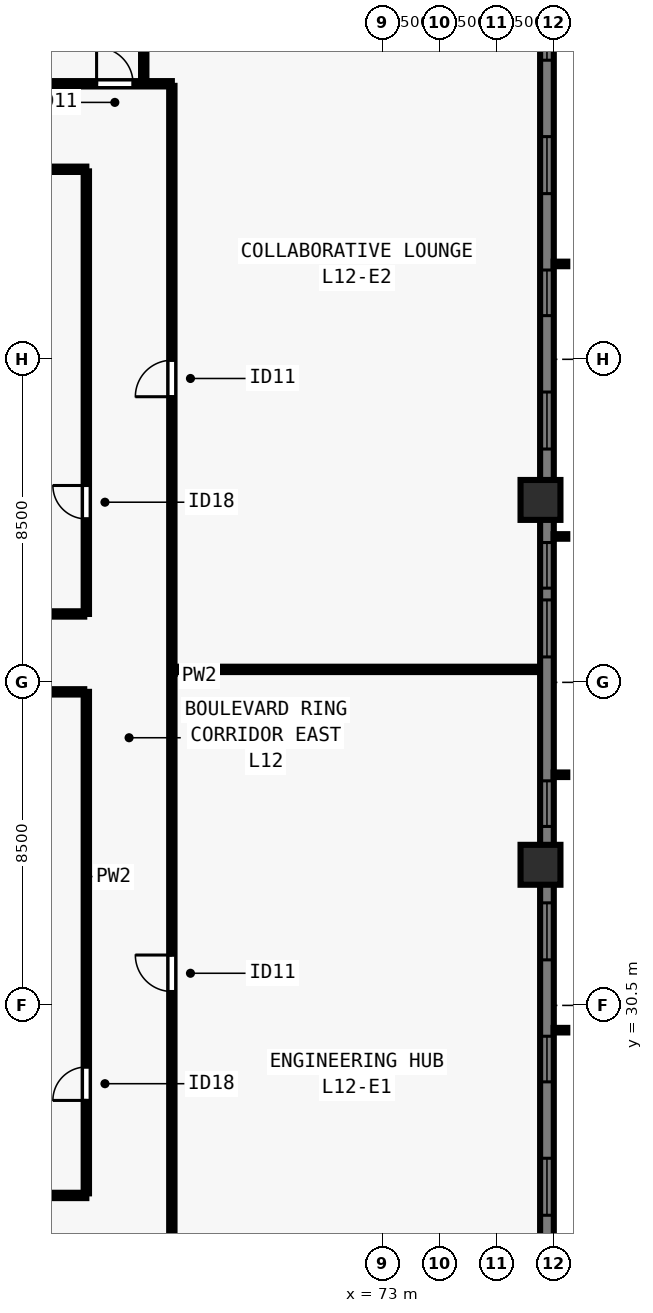
"""IFC4 building model, lengths in metres.
Left out: names, types, materials, properties, quantities, classifications, styles, units other than length and angle.
Written with IfcOpenShell. Run it as: python <this file> out.ifc"""

import sys

from ifc_helpers import new_model, si_unit, direction, frame, frame_2d, origin, origin_2d, place, context, subcontext, project, spatial, rectangle, extrude, element, fill, save


model = new_model("IFC4")
c1 = context("Model", 3, precision=1e-05, world=origin(), true_north=direction((0.0, 1.0)))
c2 = subcontext(c1, "Body", "Model", "MODEL_VIEW")
j1 = project(units=[si_unit("LENGTHUNIT", "METRE"), si_unit("PLANEANGLEUNIT", "RADIAN")], contexts=[c1])
p1 = place(None, origin())
s1 = spatial("IfcSite", under=j1, at=p1, CompositionType="ELEMENT")
p2 = place(p1, origin())
s2 = spatial("IfcBuilding", under=s1, at=p2, CompositionType="ELEMENT")
p3 = place(p2, frame((0.0, 0.0, 48.0)))
s3 = spatial("IfcBuildingStorey", under=s2, at=p3, CompositionType="ELEMENT", Elevation=48.0)
for number, where, z_axis, x_axis in (
    (1, (77.15, 34.2, 0.0), (0.0, 0.0, 1.0), (0.0, 1.0, 0.0)),
    (2, (77.15, 43.8, 0.0), (0.0, 0.0, 1.0), (0.0, 1.0, 0.0)),
):
    element("IfcColumn", number, at=place(p3, frame(where, z_axis=z_axis, x_axis=x_axis)), inside=s3, PredefinedType="COLUMN", context=c2, shape_type="SweptSolid", body=[
        extrude(rectangle(XDim=1.05, YDim=1.05, at=origin_2d()), origin(), (0.0, 0.0, 1.0), 3.5),
    ])
p4 = place(p3, frame((77.32, 61.5, 0.0), z_axis=(0.0, 0.0, 1.0), x_axis=(0.0, -1.0, 0.0)))
e3 = element("IfcWall", 3, at=p4, inside=s3, PredefinedType="SOLIDWALL", context=c2, shape_type="SweptSolid", body=[
    extrude(rectangle(XDim=44.662, YDim=0.36, at=frame_2d((22.331, 0.0))), origin(), (0.0, 0.0, 1.0), 3.28),
])
p5 = place(p4, frame((4.93, 0.0, 0.8)))
e4 = element("IfcOpeningElement", 4, at=p5, cuts=e3, PredefinedType="OPENING", context=c2, shape_type="SweptSolid", body=[
    extrude(rectangle(XDim=1.2, YDim=1.544, at=frame_2d((0.6, 0.772))), frame((0.0, 0.19, 0.0), z_axis=(0.0, -1.0, 0.0), x_axis=(1.0, 0.0, 0.0)), (0.0, 0.0, 1.0), 0.38),
])
p6 = place(p4, frame((8.14, 0.0, 0.8)))
e5 = element("IfcOpeningElement", 5, at=p6, cuts=e3, PredefinedType="OPENING", context=c2, shape_type="SweptSolid", body=[
    extrude(rectangle(XDim=1.5, YDim=1.544, at=frame_2d((0.75, 0.772))), frame((0.0, 0.19, 0.0), z_axis=(0.0, -1.0, 0.0), x_axis=(1.0, 0.0, 0.0)), (0.0, 0.0, 1.0), 0.38),
])
p7 = place(p4, frame((11.65, 0.0, 0.8)))
e6 = element("IfcOpeningElement", 6, at=p7, cuts=e3, PredefinedType="OPENING", context=c2, shape_type="SweptSolid", body=[
    extrude(rectangle(XDim=1.2, YDim=1.544, at=frame_2d((0.6, 0.772))), frame((0.0, 0.19, 0.0), z_axis=(0.0, -1.0, 0.0), x_axis=(1.0, 0.0, 0.0)), (0.0, 0.0, 1.0), 0.38),
])
p8 = place(p4, frame((14.861, 0.0, 0.8)))
e7 = element("IfcOpeningElement", 7, at=p8, cuts=e3, PredefinedType="OPENING", context=c2, shape_type="SweptSolid", body=[
    extrude(rectangle(XDim=1.5, YDim=1.544, at=frame_2d((0.75, 0.772))), frame((0.0, 0.19, 0.0), z_axis=(0.0, -1.0, 0.0), x_axis=(1.0, 0.0, 0.0)), (0.0, 0.0, 1.0), 0.38),
])
p9 = place(p4, frame((18.821, 0.0, 0.8)))
e8 = element("IfcOpeningElement", 8, at=p9, cuts=e3, PredefinedType="OPENING", context=c2, shape_type="SweptSolid", body=[
    extrude(rectangle(XDim=1.2, YDim=1.544, at=frame_2d((0.6, 0.772))), frame((0.0, 0.19, 0.0), z_axis=(0.0, -1.0, 0.0), x_axis=(1.0, 0.0, 0.0)), (0.0, 0.0, 1.0), 0.38),
])
p10 = place(p4, frame((20.331, 0.0, 0.8)))
e9 = element("IfcOpeningElement", 9, at=p10, cuts=e3, PredefinedType="OPENING", context=c2, shape_type="SweptSolid", body=[
    extrude(rectangle(XDim=1.5, YDim=1.544, at=frame_2d((0.75, 0.772))), frame((0.0, 0.19, 0.0), z_axis=(0.0, -1.0, 0.0), x_axis=(1.0, 0.0, 0.0)), (0.0, 0.0, 1.0), 0.38),
])
p11 = place(p4, frame((25.091, 0.0, 0.8)))
e10 = element("IfcOpeningElement", 10, at=p11, cuts=e3, PredefinedType="OPENING", context=c2, shape_type="SweptSolid", body=[
    extrude(rectangle(XDim=1.2, YDim=1.544, at=frame_2d((0.6, 0.772))), frame((0.0, 0.19, 0.0), z_axis=(0.0, -1.0, 0.0), x_axis=(1.0, 0.0, 0.0)), (0.0, 0.0, 1.0), 0.38),
])
p12 = place(p4, frame((28.302, 0.0, 0.8)))
e11 = element("IfcOpeningElement", 11, at=p12, cuts=e3, PredefinedType="OPENING", context=c2, shape_type="SweptSolid", body=[
    extrude(rectangle(XDim=1.5, YDim=1.544, at=frame_2d((0.75, 0.772))), frame((0.0, 0.19, 0.0), z_axis=(0.0, -1.0, 0.0), x_axis=(1.0, 0.0, 0.0)), (0.0, 0.0, 1.0), 0.38),
])
p13 = place(p4, frame((31.812, 0.0, 0.8)))
e12 = element("IfcOpeningElement", 12, at=p13, cuts=e3, PredefinedType="OPENING", context=c2, shape_type="SweptSolid", body=[
    extrude(rectangle(XDim=1.2, YDim=1.544, at=frame_2d((0.6, 0.772))), frame((0.0, 0.19, 0.0), z_axis=(0.0, -1.0, 0.0), x_axis=(1.0, 0.0, 0.0)), (0.0, 0.0, 1.0), 0.38),
])
p14 = place(p4, frame((35.022, 0.0, 0.8)))
e13 = element("IfcOpeningElement", 13, at=p14, cuts=e3, PredefinedType="OPENING", context=c2, shape_type="SweptSolid", body=[
    extrude(rectangle(XDim=1.5, YDim=1.544, at=frame_2d((0.75, 0.772))), frame((0.0, 0.19, 0.0), z_axis=(0.0, -1.0, 0.0), x_axis=(1.0, 0.0, 0.0)), (0.0, 0.0, 1.0), 0.38),
])
p15 = place(p4, frame((38.532, 0.0, 0.8)))
e14 = element("IfcOpeningElement", 14, at=p15, cuts=e3, PredefinedType="OPENING", context=c2, shape_type="SweptSolid", body=[
    extrude(rectangle(XDim=1.2, YDim=1.544, at=frame_2d((0.6, 0.772))), frame((0.0, 0.19, 0.0), z_axis=(0.0, -1.0, 0.0), x_axis=(1.0, 0.0, 0.0)), (0.0, 0.0, 1.0), 0.38),
])
p16 = place(p3, frame((36.55, 54.75, 0.0), z_axis=(0.0, 0.0, 1.0), x_axis=(1.0, 0.0, 0.0)))
e15 = element("IfcWall", 15, at=p16, inside=s3, PredefinedType="PARTITIONING", context=c2, shape_type="SweptSolid", body=[
    extrude(rectangle(XDim=30.9, YDim=0.14, at=frame_2d((15.45, 0.0))), origin(), (0.0, 0.0, 1.0), 3.28),
])
p17 = place(p16, frame((3.69, 0.0, 0.0)))
e16 = element("IfcOpeningElement", 16, at=p17, cuts=e15, PredefinedType="OPENING", context=c2, shape_type="SweptSolid", body=[
    extrude(rectangle(XDim=0.96, YDim=2.12, at=frame_2d((0.48, 1.06))), frame((0.0, 0.08, 0.0), z_axis=(0.0, -1.0, 0.0), x_axis=(1.0, 0.0, 0.0)), (0.0, 0.0, 1.0), 0.16),
])
p18 = place(p16, frame((5.013, 0.0, 0.0)))
e17 = element("IfcOpeningElement", 17, at=p18, cuts=e15, PredefinedType="OPENING", context=c2, shape_type="SweptSolid", body=[
    extrude(rectangle(XDim=0.96, YDim=2.12, at=frame_2d((0.48, 1.06))), frame((0.0, 0.08, 0.0), z_axis=(0.0, -1.0, 0.0), x_axis=(1.0, 0.0, 0.0)), (0.0, 0.0, 1.0), 0.16),
])
p19 = place(p16, frame((15.045, 0.0, 0.0)))
e18 = element("IfcOpeningElement", 18, at=p19, cuts=e15, PredefinedType="OPENING", context=c2, shape_type="SweptSolid", body=[
    extrude(rectangle(XDim=0.96, YDim=2.12, at=frame_2d((0.48, 1.06))), frame((0.0, 0.08, 0.0), z_axis=(0.0, -1.0, 0.0), x_axis=(1.0, 0.0, 0.0)), (0.0, 0.0, 1.0), 0.16),
])
p20 = place(p16, frame((25.077, 0.0, 0.0)))
e19 = element("IfcOpeningElement", 19, at=p20, cuts=e15, PredefinedType="OPENING", context=c2, shape_type="SweptSolid", body=[
    extrude(rectangle(XDim=0.96, YDim=2.12, at=frame_2d((0.48, 1.06))), frame((0.0, 0.08, 0.0), z_axis=(0.0, -1.0, 0.0), x_axis=(1.0, 0.0, 0.0)), (0.0, 0.0, 1.0), 0.16),
])
p21 = place(p16, frame((28.92, 0.0, 0.0)))
e20 = element("IfcOpeningElement", 20, at=p21, cuts=e15, PredefinedType="OPENING", context=c2, shape_type="SweptSolid", body=[
    extrude(rectangle(XDim=0.96, YDim=2.12, at=frame_2d((0.48, 1.06))), frame((0.0, 0.08, 0.0), z_axis=(0.0, -1.0, 0.0), x_axis=(1.0, 0.0, 0.0)), (0.0, 0.0, 1.0), 0.16),
])
p22 = place(p3, frame((67.45, 23.305, 0.0), z_axis=(0.0, 0.0, 1.0), x_axis=(0.0, 1.0, 0.0)))
e21 = element("IfcWall", 21, at=p22, inside=s3, PredefinedType="PARTITIONING", context=c2, shape_type="SweptSolid", body=[
    extrude(rectangle(XDim=31.39, YDim=0.14, at=frame_2d((15.695, 0.0))), origin(), (0.0, 0.0, 1.0), 3.28),
])
p23 = place(p22, frame((7.561, 0.0, 0.0)))
e22 = element("IfcOpeningElement", 22, at=p23, cuts=e21, PredefinedType="OPENING", context=c2, shape_type="SweptSolid", body=[
    extrude(rectangle(XDim=0.96, YDim=2.12, at=frame_2d((0.48, 1.06))), frame((0.0, 0.08, 0.0), z_axis=(0.0, -1.0, 0.0), x_axis=(1.0, 0.0, 0.0)), (0.0, 0.0, 1.0), 0.16),
])
p24 = place(p22, frame((23.211, 0.0, 0.0)))
e23 = element("IfcOpeningElement", 23, at=p24, cuts=e21, PredefinedType="OPENING", context=c2, shape_type="SweptSolid", body=[
    extrude(rectangle(XDim=0.96, YDim=2.12, at=frame_2d((0.48, 1.06))), frame((0.0, 0.08, 0.0), z_axis=(0.0, -1.0, 0.0), x_axis=(1.0, 0.0, 0.0)), (0.0, 0.0, 1.0), 0.16),
])
p25 = place(p3, frame((38.8, 25.5, 0.0), z_axis=(0.0, 0.0, 1.0), x_axis=(1.0, 0.0, 0.0)))
e24 = element("IfcWall", 24, at=p25, inside=s3, PredefinedType="PARTITIONING", context=c2, shape_type="SweptSolid", body=[
    extrude(rectangle(XDim=26.4, YDim=0.14, at=frame_2d((13.2, 0.0))), origin(), (0.0, 0.0, 1.0), 3.28),
])
p26 = place(p25, frame((1.2, 0.0, 0.0)))
e25 = element("IfcOpeningElement", 25, at=p26, cuts=e24, PredefinedType="OPENING", context=c2, shape_type="SweptSolid", body=[
    extrude(rectangle(XDim=0.88, YDim=2.1, at=frame_2d((0.44, 1.05))), frame((0.0, 0.08, 0.0), z_axis=(0.0, -1.0, 0.0), x_axis=(1.0, 0.0, 0.0)), (0.0, 0.0, 1.0), 0.16),
])
p27 = place(p25, frame((9.7, 0.0, 0.0)))
e26 = element("IfcOpeningElement", 26, at=p27, cuts=e24, PredefinedType="OPENING", context=c2, shape_type="SweptSolid", body=[
    extrude(rectangle(XDim=0.88, YDim=2.1, at=frame_2d((0.44, 1.05))), frame((0.0, 0.08, 0.0), z_axis=(0.0, -1.0, 0.0), x_axis=(1.0, 0.0, 0.0)), (0.0, 0.0, 1.0), 0.16),
])
p28 = place(p25, frame((20.2, 0.0, 0.0)))
e27 = element("IfcOpeningElement", 27, at=p28, cuts=e24, PredefinedType="OPENING", context=c2, shape_type="SweptSolid", body=[
    extrude(rectangle(XDim=0.88, YDim=2.1, at=frame_2d((0.44, 1.05))), frame((0.0, 0.08, 0.0), z_axis=(0.0, -1.0, 0.0), x_axis=(1.0, 0.0, 0.0)), (0.0, 0.0, 1.0), 0.16),
])
p29 = place(p3, frame((38.8, 52.5, 0.0), z_axis=(0.0, 0.0, 1.0), x_axis=(1.0, 0.0, 0.0)))
e28 = element("IfcWall", 28, at=p29, inside=s3, PredefinedType="PARTITIONING", context=c2, shape_type="SweptSolid", body=[
    extrude(rectangle(XDim=26.4, YDim=0.14, at=frame_2d((13.2, 0.0))), origin(), (0.0, 0.0, 1.0), 3.28),
])
p30 = place(p29, frame((2.2, 0.0, 0.0)))
e29 = element("IfcOpeningElement", 29, at=p30, cuts=e28, PredefinedType="OPENING", context=c2, shape_type="SweptSolid", body=[
    extrude(rectangle(XDim=0.88, YDim=2.1, at=frame_2d((0.44, 1.05))), frame((0.0, 0.08, 0.0), z_axis=(0.0, -1.0, 0.0), x_axis=(1.0, 0.0, 0.0)), (0.0, 0.0, 1.0), 0.16),
])
p31 = place(p29, frame((13.7, 0.0, 0.0)))
e30 = element("IfcOpeningElement", 30, at=p31, cuts=e28, PredefinedType="OPENING", context=c2, shape_type="SweptSolid", body=[
    extrude(rectangle(XDim=0.88, YDim=2.1, at=frame_2d((0.44, 1.05))), frame((0.0, 0.08, 0.0), z_axis=(0.0, -1.0, 0.0), x_axis=(1.0, 0.0, 0.0)), (0.0, 0.0, 1.0), 0.16),
])
p32 = place(p29, frame((23.2, 0.0, 0.0)))
e31 = element("IfcOpeningElement", 31, at=p32, cuts=e28, PredefinedType="OPENING", context=c2, shape_type="SweptSolid", body=[
    extrude(rectangle(XDim=0.88, YDim=2.1, at=frame_2d((0.44, 1.05))), frame((0.0, 0.08, 0.0), z_axis=(0.0, -1.0, 0.0), x_axis=(1.0, 0.0, 0.0)), (0.0, 0.0, 1.0), 0.16),
])
p33 = place(p3, frame((65.2, 25.555, 0.0), z_axis=(0.0, 0.0, 1.0), x_axis=(0.0, 1.0, 0.0)))
e32 = element("IfcWall", 32, at=p33, inside=s3, PredefinedType="PARTITIONING", context=c2, shape_type="SweptSolid", body=[
    extrude(rectangle(XDim=13.195, YDim=0.14, at=frame_2d((6.598, 0.0))), origin(), (0.0, 0.0, 1.0), 3.28),
])
p34 = place(p33, frame((2.445, 0.0, 0.0)))
e33 = element("IfcOpeningElement", 33, at=p34, cuts=e32, PredefinedType="OPENING", context=c2, shape_type="SweptSolid", body=[
    extrude(rectangle(XDim=0.88, YDim=2.1, at=frame_2d((0.44, 1.05))), frame((0.0, 0.08, 0.0), z_axis=(0.0, -1.0, 0.0), x_axis=(1.0, 0.0, 0.0)), (0.0, 0.0, 1.0), 0.16),
])
p35 = place(p3, frame((65.2, 40.8, 0.0), z_axis=(0.0, 0.0, 1.0), x_axis=(0.0, 1.0, 0.0)))
e34 = element("IfcWall", 34, at=p35, inside=s3, PredefinedType="PARTITIONING", context=c2, shape_type="SweptSolid", body=[
    extrude(rectangle(XDim=11.645, YDim=0.14, at=frame_2d((5.823, 0.0))), origin(), (0.0, 0.0, 1.0), 3.28),
])
p36 = place(p35, frame((2.5, 0.0, 0.0)))
e35 = element("IfcOpeningElement", 35, at=p36, cuts=e34, PredefinedType="OPENING", context=c2, shape_type="SweptSolid", body=[
    extrude(rectangle(XDim=0.88, YDim=2.1, at=frame_2d((0.44, 1.05))), frame((0.0, 0.08, 0.0), z_axis=(0.0, -1.0, 0.0), x_axis=(1.0, 0.0, 0.0)), (0.0, 0.0, 1.0), 0.16),
])
for number, where, z_axis, x_axis in (
    (36, (60.76, 38.75, 0.0), (0.0, 0.0, 1.0), (1.0, 0.0, 0.0)),
    (37, (60.76, 40.8, 0.0), (0.0, 0.0, 1.0), (1.0, 0.0, 0.0)),
):
    element("IfcWall", number, at=place(p3, frame(where, z_axis=z_axis, x_axis=x_axis)), inside=s3, PredefinedType="PARTITIONING", context=c2, shape_type="SweptSolid", body=[
        extrude(rectangle(XDim=4.385, YDim=0.14, at=frame_2d((2.192, 0.0))), origin(), (0.0, 0.0, 1.0), 3.28),
    ])
p37 = place(p3, frame((66.71, 54.85, 0.0), z_axis=(0.0, 0.0, 1.0), x_axis=(0.0, 1.0, 0.0)))
e38 = element("IfcWall", 38, at=p37, inside=s3, PredefinedType="PARTITIONING", context=c2, shape_type="SweptSolid", body=[
    extrude(rectangle(XDim=9.23, YDim=0.14, at=frame_2d((4.615, 0.0))), origin(), (0.0, 0.0, 1.0), 2.439),
])
p38 = place(p3, frame((67.55, 39.341, 0.0), z_axis=(0.0, 0.0, 1.0), x_axis=(1.0, 0.0, 0.0)))
e39 = element("IfcWall", 39, at=p38, inside=s3, PredefinedType="PARTITIONING", context=c2, shape_type="SweptSolid", body=[
    extrude(rectangle(XDim=9.53, YDim=0.14, at=frame_2d((4.765, 0.0))), origin(), (0.0, 0.0, 1.0), 3.28),
])
p39 = place(p5, origin())
e40 = element("IfcWindow", 40, at=p39, inside=s3, PartitioningType="SINGLE_PANEL", PredefinedType="WINDOW", context=c2, shape_type="SweptSolid", body=[
    extrude(rectangle(XDim=1.2, YDim=1.544, at=frame_2d((0.6, 0.772))), frame((0.0, -0.05, 0.0), z_axis=(0.0, -1.0, 0.0), x_axis=(1.0, 0.0, 0.0)), (0.0, 0.0, 1.0), 0.06),
])
fill(e4, e40)
p40 = place(p6, origin())
e41 = element("IfcWindow", 41, at=p40, inside=s3, PartitioningType="SINGLE_PANEL", PredefinedType="WINDOW", context=c2, shape_type="SweptSolid", body=[
    extrude(rectangle(XDim=1.5, YDim=1.544, at=frame_2d((0.75, 0.772))), frame((0.0, -0.05, 0.0), z_axis=(0.0, -1.0, 0.0), x_axis=(1.0, 0.0, 0.0)), (0.0, 0.0, 1.0), 0.06),
])
fill(e5, e41)
p41 = place(p7, origin())
e42 = element("IfcWindow", 42, at=p41, inside=s3, PartitioningType="SINGLE_PANEL", PredefinedType="WINDOW", context=c2, shape_type="SweptSolid", body=[
    extrude(rectangle(XDim=1.2, YDim=1.544, at=frame_2d((0.6, 0.772))), frame((0.0, -0.05, 0.0), z_axis=(0.0, -1.0, 0.0), x_axis=(1.0, 0.0, 0.0)), (0.0, 0.0, 1.0), 0.06),
])
fill(e6, e42)
p42 = place(p8, origin())
e43 = element("IfcWindow", 43, at=p42, inside=s3, PartitioningType="SINGLE_PANEL", PredefinedType="WINDOW", context=c2, shape_type="SweptSolid", body=[
    extrude(rectangle(XDim=1.5, YDim=1.544, at=frame_2d((0.75, 0.772))), frame((0.0, -0.05, 0.0), z_axis=(0.0, -1.0, 0.0), x_axis=(1.0, 0.0, 0.0)), (0.0, 0.0, 1.0), 0.06),
])
fill(e7, e43)
p43 = place(p9, origin())
e44 = element("IfcWindow", 44, at=p43, inside=s3, PartitioningType="SINGLE_PANEL", PredefinedType="WINDOW", context=c2, shape_type="SweptSolid", body=[
    extrude(rectangle(XDim=1.2, YDim=1.544, at=frame_2d((0.6, 0.772))), frame((0.0, -0.05, 0.0), z_axis=(0.0, -1.0, 0.0), x_axis=(1.0, 0.0, 0.0)), (0.0, 0.0, 1.0), 0.06),
])
fill(e8, e44)
p44 = place(p10, origin())
e45 = element("IfcWindow", 45, at=p44, inside=s3, PartitioningType="SINGLE_PANEL", PredefinedType="WINDOW", context=c2, shape_type="SweptSolid", body=[
    extrude(rectangle(XDim=1.5, YDim=1.544, at=frame_2d((0.75, 0.772))), frame((0.0, -0.05, 0.0), z_axis=(0.0, -1.0, 0.0), x_axis=(1.0, 0.0, 0.0)), (0.0, 0.0, 1.0), 0.06),
])
fill(e9, e45)
p45 = place(p11, origin())
e46 = element("IfcWindow", 46, at=p45, inside=s3, PartitioningType="SINGLE_PANEL", PredefinedType="WINDOW", context=c2, shape_type="SweptSolid", body=[
    extrude(rectangle(XDim=1.2, YDim=1.544, at=frame_2d((0.6, 0.772))), frame((0.0, -0.05, 0.0), z_axis=(0.0, -1.0, 0.0), x_axis=(1.0, 0.0, 0.0)), (0.0, 0.0, 1.0), 0.06),
])
fill(e10, e46)
p46 = place(p12, origin())
e47 = element("IfcWindow", 47, at=p46, inside=s3, PartitioningType="SINGLE_PANEL", PredefinedType="WINDOW", context=c2, shape_type="SweptSolid", body=[
    extrude(rectangle(XDim=1.5, YDim=1.544, at=frame_2d((0.75, 0.772))), frame((0.0, -0.05, 0.0), z_axis=(0.0, -1.0, 0.0), x_axis=(1.0, 0.0, 0.0)), (0.0, 0.0, 1.0), 0.06),
])
fill(e11, e47)
p47 = place(p13, origin())
e48 = element("IfcWindow", 48, at=p47, inside=s3, PartitioningType="SINGLE_PANEL", PredefinedType="WINDOW", context=c2, shape_type="SweptSolid", body=[
    extrude(rectangle(XDim=1.2, YDim=1.544, at=frame_2d((0.6, 0.772))), frame((0.0, -0.05, 0.0), z_axis=(0.0, -1.0, 0.0), x_axis=(1.0, 0.0, 0.0)), (0.0, 0.0, 1.0), 0.06),
])
fill(e12, e48)
p48 = place(p14, origin())
e49 = element("IfcWindow", 49, at=p48, inside=s3, PartitioningType="SINGLE_PANEL", PredefinedType="WINDOW", context=c2, shape_type="SweptSolid", body=[
    extrude(rectangle(XDim=1.5, YDim=1.544, at=frame_2d((0.75, 0.772))), frame((0.0, -0.05, 0.0), z_axis=(0.0, -1.0, 0.0), x_axis=(1.0, 0.0, 0.0)), (0.0, 0.0, 1.0), 0.06),
])
fill(e13, e49)
p49 = place(p34, origin())
e50 = element("IfcDoor", 50, at=p49, inside=s3, OperationType="SINGLE_SWING_LEFT", PredefinedType="DOOR", context=c2, shape_type="SweptSolid", body=[
    extrude(rectangle(XDim=0.88, YDim=2.1, at=frame_2d((0.44, 1.05))), frame((0.0, 0.025, 0.0), z_axis=(0.0, -1.0, 0.0), x_axis=(1.0, 0.0, 0.0)), (0.0, 0.0, 1.0), 0.05),
])
fill(e33, e50)
p50 = place(p36, origin())
e51 = element("IfcDoor", 51, at=p50, inside=s3, OperationType="SINGLE_SWING_RIGHT", PredefinedType="DOOR", context=c2, shape_type="SweptSolid", body=[
    extrude(rectangle(XDim=0.88, YDim=2.1, at=frame_2d((0.44, 1.05))), frame((0.0, 0.025, 0.0), z_axis=(0.0, -1.0, 0.0), x_axis=(1.0, 0.0, 0.0)), (0.0, 0.0, 1.0), 0.05),
])
fill(e35, e51)
p51 = place(p21, origin())
e52 = element("IfcDoor", 52, at=p51, inside=s3, OperationType="SINGLE_SWING_LEFT", PredefinedType="DOOR", context=c2, shape_type="SweptSolid", body=[
    extrude(rectangle(XDim=0.96, YDim=2.12, at=frame_2d((0.48, 1.06))), frame((0.0, 0.025, 0.0), z_axis=(0.0, -1.0, 0.0), x_axis=(1.0, 0.0, 0.0)), (0.0, 0.0, 1.0), 0.05),
])
fill(e20, e52)
p52 = place(p23, origin())
e53 = element("IfcDoor", 53, at=p52, inside=s3, OperationType="SINGLE_SWING_RIGHT", PredefinedType="DOOR", context=c2, shape_type="SweptSolid", body=[
    extrude(rectangle(XDim=0.96, YDim=2.12, at=frame_2d((0.48, 1.06))), frame((0.0, 0.025, 0.0), z_axis=(0.0, -1.0, 0.0), x_axis=(1.0, 0.0, 0.0)), (0.0, 0.0, 1.0), 0.05),
])
fill(e22, e53)
p53 = place(p24, origin())
e54 = element("IfcDoor", 54, at=p53, inside=s3, OperationType="SINGLE_SWING_LEFT", PredefinedType="DOOR", context=c2, shape_type="SweptSolid", body=[
    extrude(rectangle(XDim=0.96, YDim=2.12, at=frame_2d((0.48, 1.06))), frame((0.0, 0.025, 0.0), z_axis=(0.0, -1.0, 0.0), x_axis=(1.0, 0.0, 0.0)), (0.0, 0.0, 1.0), 0.05),
])
fill(e23, e54)
save(model, sys.argv[1])
